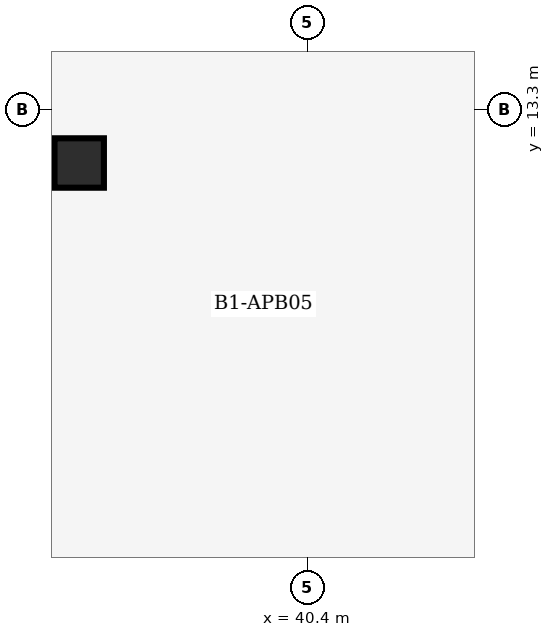
"""IFC4 building model, lengths in metres.
Left out: names, types, materials, properties, quantities, classifications, styles, units other than length and angle.
Written with IfcOpenShell. Run it as: python <this file> out.ifc"""

import sys

from ifc_helpers import new_model, si_unit, direction, frame, origin, origin_2d, place, context, subcontext, project, spatial, rectangle, extrude, element, save


model = new_model("IFC4")
c1 = context("Model", 3, precision=1e-05, world=origin(), true_north=direction((0.0, 1.0)))
c2 = subcontext(c1, "Body", "Model", "MODEL_VIEW")
j1 = project(units=[si_unit("LENGTHUNIT", "METRE"), si_unit("PLANEANGLEUNIT", "RADIAN")], contexts=[c1])
p1 = place(None, origin())
s1 = spatial("IfcSite", under=j1, at=p1, CompositionType="ELEMENT")
p2 = place(p1, origin())
s2 = spatial("IfcBuilding", under=s1, at=p2, CompositionType="ELEMENT")
p3 = place(p2, frame((0.0, 0.0, -4.8)))
s3 = spatial("IfcBuildingStorey", under=s2, at=p3, CompositionType="ELEMENT", Elevation=-4.8)
p4 = place(p3, frame((37.4, 12.6, 0.0), z_axis=(0.0, 0.0, 1.0), x_axis=(1.0, 0.0, 0.0)))
e1 = element("IfcColumn", 1, at=p4, inside=s3, PredefinedType="COLUMN", context=c2, shape_type="SweptSolid", body=[
    extrude(rectangle(XDim=0.65, YDim=0.65, at=origin_2d()), origin(), (0.0, 0.0, 1.0), 4.8),
])
save(model, sys.argv[1])
